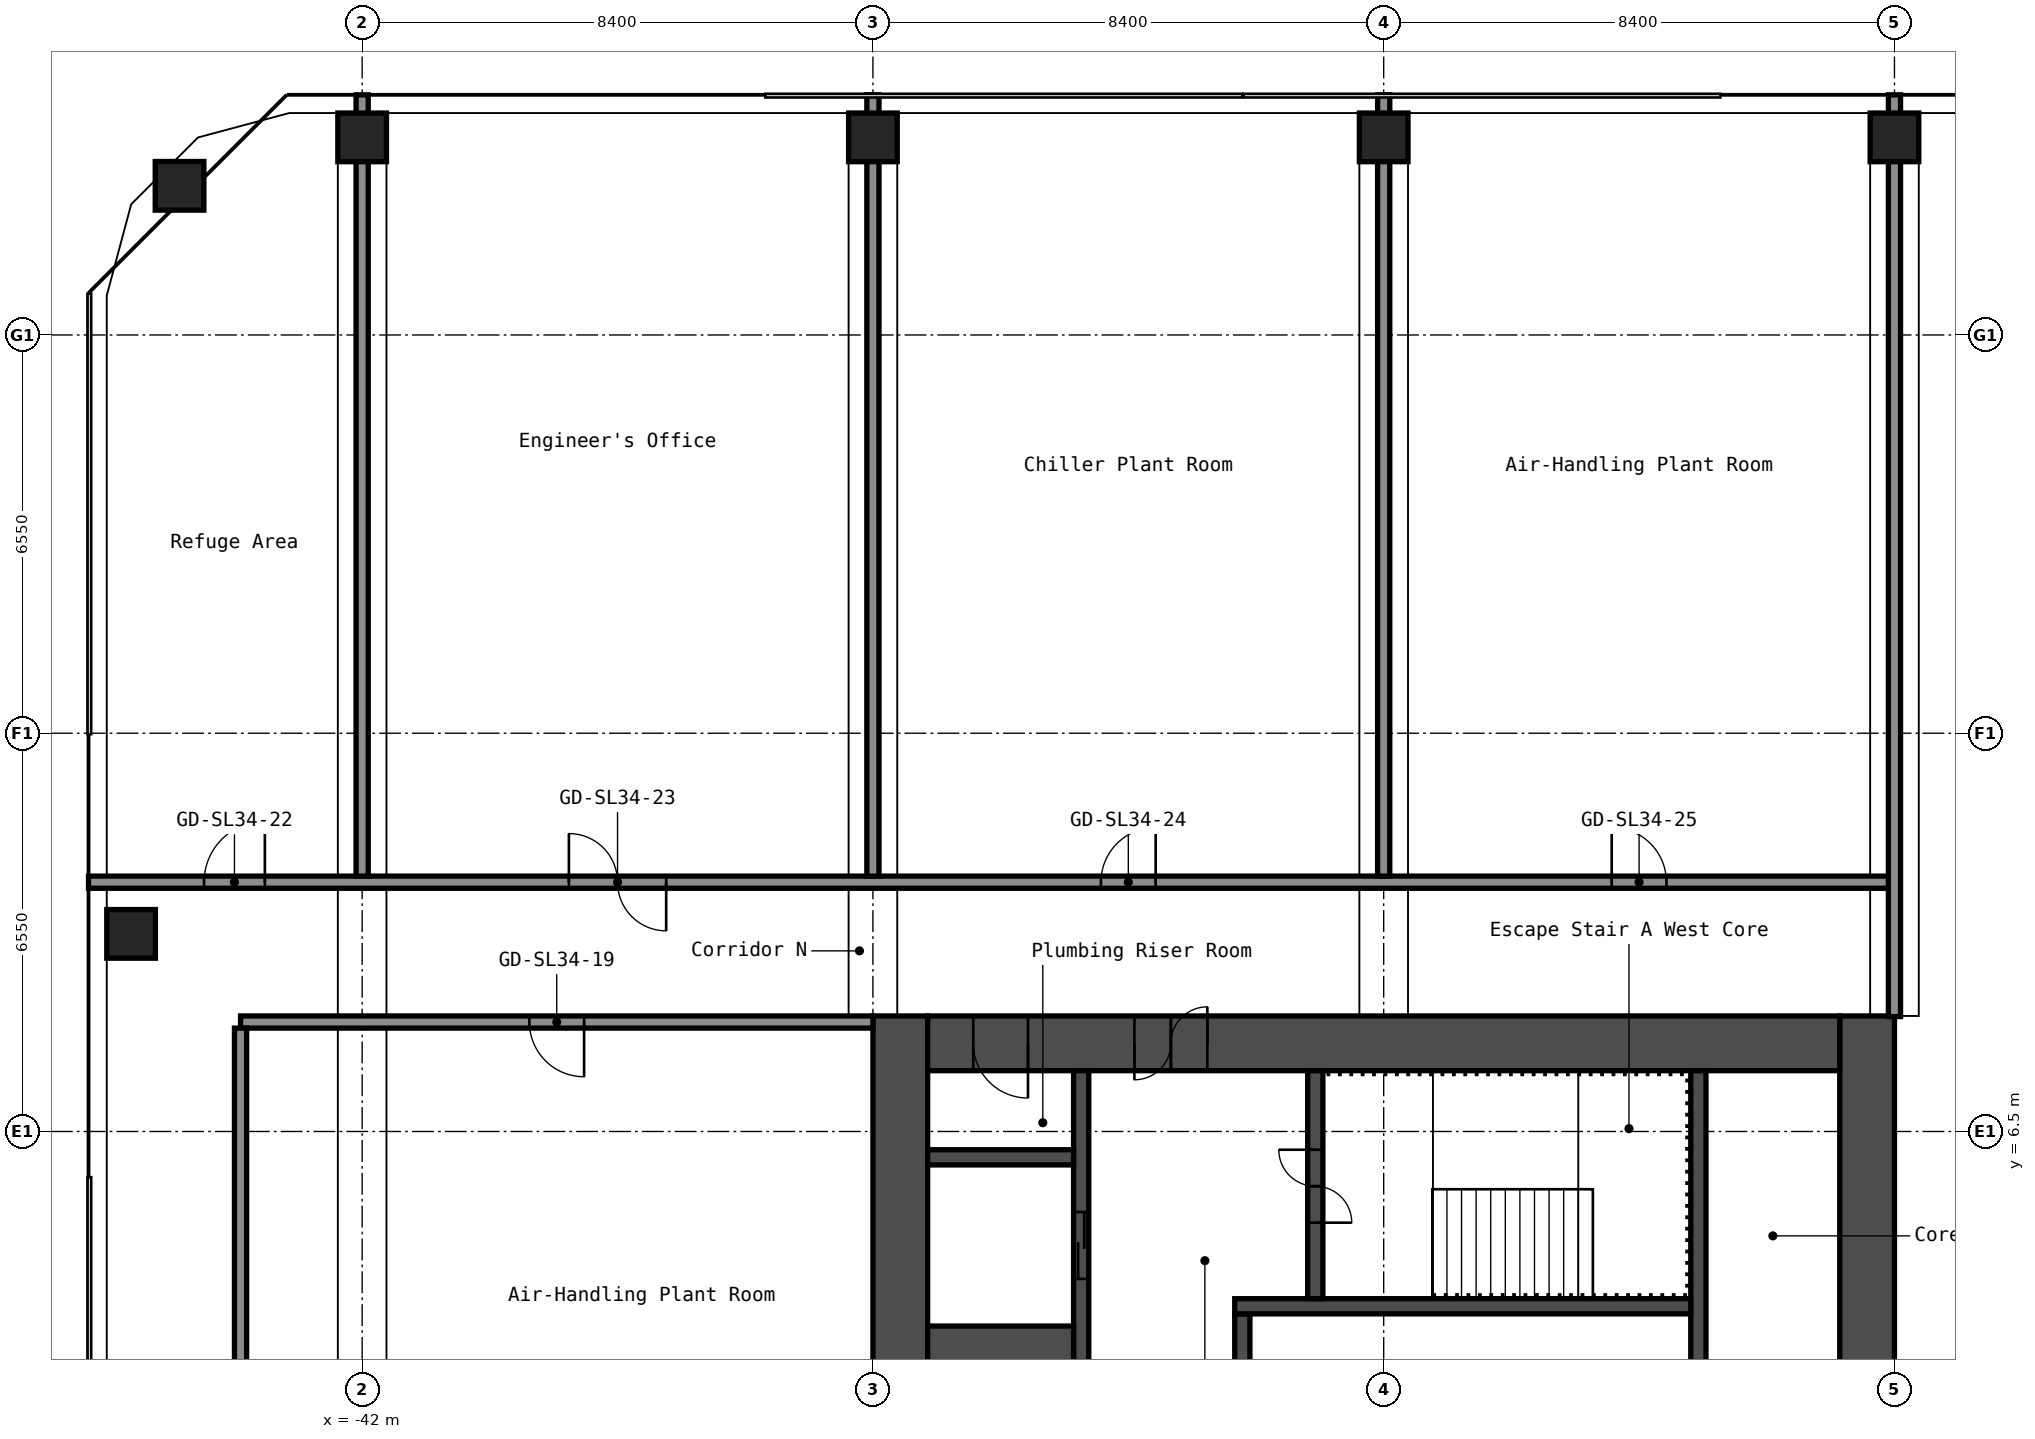
"""IFC4 building model, lengths in metres.
Left out: names, types, materials, properties, quantities, classifications, styles, units other than length and angle.
Written with IfcOpenShell. Run it as: python <this file> out.ifc"""

import sys

from ifc_helpers import new_model, si_unit, direction, frame, frame_2d, origin, origin_2d, place, context, subcontext, project, spatial, rectangle, hollow_rectangle, extrude, element, fill, save


model = new_model("IFC4")
c1 = context("Model", 3, precision=1e-05, world=origin(), true_north=direction((0.0, 1.0)))
c2 = subcontext(c1, "Body", "Model", "MODEL_VIEW")
j1 = project(units=[si_unit("LENGTHUNIT", "METRE"), si_unit("PLANEANGLEUNIT", "RADIAN")], contexts=[c1])
p1 = place(None, origin())
s1 = spatial("IfcSite", under=j1, at=p1, CompositionType="ELEMENT")
p2 = place(p1, origin())
s2 = spatial("IfcBuilding", under=s1, at=p2, CompositionType="ELEMENT")
p3 = place(p2, frame((0.0, 0.0, 120.2)))
s3 = spatial("IfcBuildingStorey", under=s2, at=p3, CompositionType="ELEMENT", Elevation=120.2)
for number, where, z_axis, x_axis in (
    (1, (-45.8, 9.75, 0.0), (0.0, 0.0, 1.0), (1.0, 0.0, 0.0)),
    (2, (-45.003, 22.053, 0.0), (0.0, 0.0, 1.0), (1.0, 0.0, 0.0)),
    (3, (-42.0, 22.85, 0.0), (0.0, 0.0, 1.0), (1.0, 0.0, 0.0)),
    (4, (-33.6, 22.85, 0.0), (0.0, 0.0, 1.0), (1.0, 0.0, 0.0)),
    (5, (-25.2, 22.85, 0.0), (0.0, 0.0, 1.0), (1.0, 0.0, 0.0)),
    (6, (-16.8, 22.85, 0.0), (0.0, 0.0, 1.0), (1.0, 0.0, 0.0)),
):
    element("IfcColumn", number, at=place(p3, frame(where, z_axis=z_axis, x_axis=x_axis)), inside=s3, PredefinedType="COLUMN", context=c2, shape_type="SweptSolid", body=[
        extrude(hollow_rectangle(XDim=0.8, YDim=0.8, WallThickness=0.032, at=origin_2d()), origin(), (0.0, 0.0, 1.0), 4.1),
    ])
p4 = place(p3, frame((-17.25, -8.4, 0.0), z_axis=(0.0, 0.0, 1.0), x_axis=(0.0, 1.0, 0.0)))
e7 = element("IfcWall", 7, at=p4, inside=s3, PredefinedType="SHEAR", context=c2, shape_type="SweptSolid", body=[
    extrude(rectangle(XDim=16.8, YDim=0.9, at=frame_2d((8.4, 0.0))), origin(), (0.0, 0.0, 1.0), 4.1),
])
p5 = place(p4, frame((7.1, 0.0, 0.0)))
e8 = element("IfcOpeningElement", 8, at=p5, cuts=e7, PredefinedType="OPENING", context=c2, shape_type="SweptSolid", body=[
    extrude(rectangle(XDim=1.6, YDim=2.1, at=frame_2d((0.8, 1.05))), frame((0.0, 0.46, 0.0), z_axis=(0.0, -1.0, 0.0), x_axis=(1.0, 0.0, 0.0)), (0.0, 0.0, 1.0), 0.92),
])
p6 = place(p3, frame((-33.15, -8.4, 0.0), z_axis=(0.0, 0.0, 1.0), x_axis=(0.0, 1.0, 0.0)))
e9 = element("IfcWall", 9, at=p6, inside=s3, PredefinedType="SHEAR", context=c2, shape_type="SweptSolid", body=[
    extrude(rectangle(XDim=16.8, YDim=0.9, at=frame_2d((8.4, 0.0))), origin(), (0.0, 0.0, 1.0), 4.1),
])
p7 = place(p3, frame((-32.7, 7.95, 0.0), z_axis=(0.0, 0.0, 1.0), x_axis=(1.0, 0.0, 0.0)))
e10 = element("IfcWall", 10, at=p7, inside=s3, PredefinedType="SHEAR", context=c2, shape_type="SweptSolid", body=[
    extrude(rectangle(XDim=15.0, YDim=0.9, at=frame_2d((7.5, 0.0))), origin(), (0.0, 0.0, 1.0), 4.1),
])
p8 = place(p7, frame((3.4, 0.0, 0.0)))
e11 = element("IfcOpeningElement", 11, at=p8, cuts=e10, PredefinedType="OPENING", context=c2, shape_type="SweptSolid", body=[
    extrude(rectangle(XDim=1.2, YDim=2.1, at=frame_2d((0.6, 1.05))), frame((0.0, 0.46, 0.0), z_axis=(0.0, -1.0, 0.0), x_axis=(1.0, 0.0, 0.0)), (0.0, 0.0, 1.0), 0.92),
])
p9 = place(p7, frame((0.75, 0.0, 0.0)))
e12 = element("IfcOpeningElement", 12, at=p9, cuts=e10, PredefinedType="OPENING", context=c2, shape_type="SweptSolid", body=[
    extrude(rectangle(XDim=0.9, YDim=2.1, at=frame_2d((0.45, 1.05))), frame((0.0, 0.46, 0.0), z_axis=(0.0, -1.0, 0.0), x_axis=(1.0, 0.0, 0.0)), (0.0, 0.0, 1.0), 0.92),
])
p10 = place(p3, frame((-20.025, 1.2, 0.0), z_axis=(0.0, 0.0, 1.0), x_axis=(0.0, 1.0, 0.0)))
e13 = element("IfcWall", 13, at=p10, inside=s3, PredefinedType="SHEAR", context=c2, shape_type="SweptSolid", body=[
    extrude(rectangle(XDim=6.3, YDim=0.25, at=frame_2d((3.15, 0.0))), origin(), (0.0, 0.0, 1.0), 4.1),
])
p11 = place(p3, frame((-27.525, 1.45, 0.0), z_axis=(0.0, 0.0, 1.0), x_axis=(0.0, 1.0, 0.0)))
e14 = element("IfcWall", 14, at=p11, inside=s3, PredefinedType="SHEAR", context=c2, shape_type="SweptSolid", body=[
    extrude(rectangle(XDim=2.05, YDim=0.25, at=frame_2d((1.025, 0.0))), origin(), (0.0, 0.0, 1.0), 4.1),
])
p12 = place(p3, frame((-27.65, 3.625, 0.0), z_axis=(0.0, 0.0, 1.0), x_axis=(1.0, 0.0, 0.0)))
e15 = element("IfcWall", 15, at=p12, inside=s3, PredefinedType="SHEAR", context=c2, shape_type="SweptSolid", body=[
    extrude(rectangle(XDim=7.5, YDim=0.25, at=frame_2d((3.75, 0.0))), origin(), (0.0, 0.0, 1.0), 4.1),
])
p13 = place(p3, frame((-26.325, 3.75, 0.0), z_axis=(0.0, 0.0, 1.0), x_axis=(0.0, 1.0, 0.0)))
e16 = element("IfcWall", 16, at=p13, inside=s3, PredefinedType="SHEAR", context=c2, shape_type="SweptSolid", body=[
    extrude(rectangle(XDim=3.75, YDim=0.25, at=frame_2d((1.875, 0.0))), origin(), (0.0, 0.0, 1.0), 4.1),
])
p14 = place(p13, frame((1.25, 0.0, 0.0)))
e17 = element("IfcOpeningElement", 17, at=p14, cuts=e16, PredefinedType="OPENING", context=c2, shape_type="SweptSolid", body=[
    extrude(rectangle(XDim=1.2, YDim=2.1, at=frame_2d((0.6, 1.05))), frame((0.0, 0.135, 0.0), z_axis=(0.0, -1.0, 0.0), x_axis=(1.0, 0.0, 0.0)), (0.0, 0.0, 1.0), 0.27),
])
p15 = place(p3, frame((-30.175, 1.45, 0.0), z_axis=(0.0, 0.0, 1.0), x_axis=(0.0, 1.0, 0.0)))
e18 = element("IfcWall", 18, at=p15, inside=s3, PredefinedType="SHEAR", context=c2, shape_type="SweptSolid", body=[
    extrude(rectangle(XDim=6.05, YDim=0.25, at=frame_2d((3.025, 0.0))), origin(), (0.0, 0.0, 1.0), 4.1),
])
p16 = place(p15, frame((2.625, 0.0, 0.0)))
e19 = element("IfcOpeningElement", 19, at=p16, cuts=e18, PredefinedType="OPENING", context=c2, shape_type="SweptSolid", body=[
    extrude(rectangle(XDim=1.1, YDim=2.1, at=frame_2d((0.55, 1.05))), frame((0.0, 0.135, 0.0), z_axis=(0.0, -1.0, 0.0), x_axis=(1.0, 0.0, 0.0)), (0.0, 0.0, 1.0), 0.27),
])
p17 = place(p3, frame((-32.7, 2.375, 0.0), z_axis=(0.0, 0.0, 1.0), x_axis=(1.0, 0.0, 0.0)))
e20 = element("IfcWall", 20, at=p17, inside=s3, PredefinedType="SHEAR", context=c2, shape_type="SweptSolid", body=[
    extrude(rectangle(XDim=2.4, YDim=1.85, at=frame_2d((1.2, 0.0))), origin(), (0.0, 0.0, 1.0), 4.1),
])
p18 = place(p3, frame((-32.7, 6.075, 0.0), z_axis=(0.0, 0.0, 1.0), x_axis=(1.0, 0.0, 0.0)))
e21 = element("IfcWall", 21, at=p18, inside=s3, PredefinedType="SHEAR", context=c2, shape_type="SweptSolid", body=[
    extrude(rectangle(XDim=2.4, YDim=0.25, at=frame_2d((1.2, 0.0))), origin(), (0.0, 0.0, 1.0), 4.1),
])
p19 = place(p3, frame((-44.0, 8.3, 0.0), z_axis=(0.0, 0.0, 1.0), x_axis=(1.0, 0.0, 0.0)))
e22 = element("IfcWall", 22, at=p19, inside=s3, PredefinedType="PARTITIONING", context=c2, shape_type="SweptSolid", body=[
    extrude(rectangle(XDim=10.4, YDim=0.2, at=frame_2d((5.2, 0.0))), origin(), (0.0, 0.0, 1.0), 4.1),
])
p20 = place(p19, frame((4.75, 0.0, 0.0)))
e23 = element("IfcOpeningElement", 23, at=p20, cuts=e22, PredefinedType="OPENING", context=c2, shape_type="SweptSolid", body=[
    extrude(rectangle(XDim=0.9, YDim=2.1, at=frame_2d((0.45, 1.05))), frame((0.0, 0.11, 0.0), z_axis=(0.0, -1.0, 0.0), x_axis=(1.0, 0.0, 0.0)), (0.0, 0.0, 1.0), 0.22),
])
p21 = place(p3, frame((-46.5, 10.6, 0.0), z_axis=(0.0, 0.0, 1.0), x_axis=(1.0, 0.0, 0.0)))
e24 = element("IfcWall", 24, at=p21, inside=s3, PredefinedType="PARTITIONING", context=c2, shape_type="SweptSolid", body=[
    extrude(rectangle(XDim=29.7, YDim=0.2, at=frame_2d((14.85, 0.0))), origin(), (0.0, 0.0, 1.0), 4.1),
])
p22 = place(p21, frame((1.9, 0.0, 0.0)))
e25 = element("IfcOpeningElement", 25, at=p22, cuts=e24, PredefinedType="OPENING", context=c2, shape_type="SweptSolid", body=[
    extrude(rectangle(XDim=1.0, YDim=2.1, at=frame_2d((0.5, 1.05))), frame((0.0, 0.11, 0.0), z_axis=(0.0, -1.0, 0.0), x_axis=(1.0, 0.0, 0.0)), (0.0, 0.0, 1.0), 0.22),
])
p23 = place(p21, frame((7.9, 0.0, 0.0)))
e26 = element("IfcOpeningElement", 26, at=p23, cuts=e24, PredefinedType="OPENING", context=c2, shape_type="SweptSolid", body=[
    extrude(rectangle(XDim=1.6, YDim=2.1, at=frame_2d((0.8, 1.05))), frame((0.0, 0.11, 0.0), z_axis=(0.0, -1.0, 0.0), x_axis=(1.0, 0.0, 0.0)), (0.0, 0.0, 1.0), 0.22),
])
p24 = place(p21, frame((16.65, 0.0, 0.0)))
e27 = element("IfcOpeningElement", 27, at=p24, cuts=e24, PredefinedType="OPENING", context=c2, shape_type="SweptSolid", body=[
    extrude(rectangle(XDim=0.9, YDim=2.1, at=frame_2d((0.45, 1.05))), frame((0.0, 0.11, 0.0), z_axis=(0.0, -1.0, 0.0), x_axis=(1.0, 0.0, 0.0)), (0.0, 0.0, 1.0), 0.22),
])
p25 = place(p21, frame((25.05, 0.0, 0.0)))
e28 = element("IfcOpeningElement", 28, at=p25, cuts=e24, PredefinedType="OPENING", context=c2, shape_type="SweptSolid", body=[
    extrude(rectangle(XDim=0.9, YDim=2.1, at=frame_2d((0.45, 1.05))), frame((0.0, 0.11, 0.0), z_axis=(0.0, -1.0, 0.0), x_axis=(1.0, 0.0, 0.0)), (0.0, 0.0, 1.0), 0.22),
])
p26 = place(p3, frame((-44.0, -8.2, 0.0), z_axis=(0.0, 0.0, 1.0), x_axis=(0.0, 1.0, 0.0)))
e29 = element("IfcWall", 29, at=p26, inside=s3, PredefinedType="PARTITIONING", context=c2, shape_type="SweptSolid", body=[
    extrude(rectangle(XDim=16.4, YDim=0.2, at=frame_2d((8.2, 0.0))), origin(), (0.0, 0.0, 1.0), 4.1),
])
for number, where, z_axis, x_axis in (
    (30, (-42.0, 10.7, 0.0), (0.0, 0.0, 1.0), (0.0, 1.0, 0.0)),
    (31, (-33.6, 10.7, 0.0), (0.0, 0.0, 1.0), (0.0, 1.0, 0.0)),
    (32, (-25.2, 10.7, 0.0), (0.0, 0.0, 1.0), (0.0, 1.0, 0.0)),
):
    element("IfcWall", number, at=place(p3, frame(where, z_axis=z_axis, x_axis=x_axis)), inside=s3, PredefinedType="PARTITIONING", context=c2, shape_type="SweptSolid", body=[
        extrude(rectangle(XDim=12.85, YDim=0.2, at=frame_2d((6.425, 0.0))), origin(), (0.0, 0.0, 1.0), 4.1),
    ])
p27 = place(p3, frame((-16.8, 8.39, 0.0), z_axis=(0.0, 0.0, 1.0), x_axis=(0.0, 1.0, 0.0)))
e33 = element("IfcWall", 33, at=p27, inside=s3, PredefinedType="PARTITIONING", context=c2, shape_type="SweptSolid", body=[
    extrude(rectangle(XDim=15.16, YDim=0.2, at=frame_2d((7.58, 0.0))), origin(), (0.0, 0.0, 1.0), 4.1),
])
p28 = place(p8, origin())
e34 = element("IfcDoor", 34, at=p28, inside=s3, OperationType="DOUBLE_DOOR_SINGLE_SWING", PredefinedType="DOOR", context=c2, shape_type="SweptSolid", body=[
    extrude(rectangle(XDim=1.2, YDim=2.1, at=frame_2d((0.6, 1.05))), frame((0.0, 0.025, 0.0), z_axis=(0.0, -1.0, 0.0), x_axis=(1.0, 0.0, 0.0)), (0.0, 0.0, 1.0), 0.05),
])
fill(e11, e34)
p29 = place(p9, origin())
e35 = element("IfcDoor", 35, at=p29, inside=s3, OperationType="SINGLE_SWING_RIGHT", PredefinedType="DOOR", context=c2, shape_type="SweptSolid", body=[
    extrude(rectangle(XDim=0.9, YDim=2.1, at=frame_2d((0.45, 1.05))), frame((0.0, 0.025, 0.0), z_axis=(0.0, -1.0, 0.0), x_axis=(1.0, 0.0, 0.0)), (0.0, 0.0, 1.0), 0.05),
])
fill(e12, e35)
p30 = place(p14, origin())
e36 = element("IfcDoor", 36, at=p30, inside=s3, OperationType="DOUBLE_DOOR_SINGLE_SWING", PredefinedType="DOOR", context=c2, shape_type="SweptSolid", body=[
    extrude(rectangle(XDim=1.2, YDim=2.1, at=frame_2d((0.6, 1.05))), frame((0.0, 0.025, 0.0), z_axis=(0.0, -1.0, 0.0), x_axis=(1.0, 0.0, 0.0)), (0.0, 0.0, 1.0), 0.05),
])
fill(e17, e36)
p31 = place(p16, origin())
e37 = element("IfcDoor", 37, at=p31, inside=s3, OperationType="DOUBLE_DOOR_SLIDING", PredefinedType="DOOR", context=c2, shape_type="SweptSolid", body=[
    extrude(rectangle(XDim=1.1, YDim=2.1, at=frame_2d((0.55, 1.05))), frame((0.0, 0.025, 0.0), z_axis=(0.0, -1.0, 0.0), x_axis=(1.0, 0.0, 0.0)), (0.0, 0.0, 1.0), 0.05),
])
fill(e19, e37)
p32 = place(p20, origin())
e38 = element("IfcDoor", 38, at=p32, inside=s3, OperationType="SINGLE_SWING_RIGHT", PredefinedType="DOOR", context=c2, shape_type="SweptSolid", body=[
    extrude(rectangle(XDim=0.9, YDim=2.1, at=frame_2d((0.45, 1.05))), frame((0.0, 0.025, 0.0), z_axis=(0.0, -1.0, 0.0), x_axis=(1.0, 0.0, 0.0)), (0.0, 0.0, 1.0), 0.05),
])
fill(e23, e38)
p33 = place(p22, origin())
e39 = element("IfcDoor", 39, at=p33, inside=s3, OperationType="SINGLE_SWING_LEFT", PredefinedType="DOOR", context=c2, shape_type="SweptSolid", body=[
    extrude(rectangle(XDim=1.0, YDim=2.1, at=frame_2d((0.5, 1.05))), frame((0.0, 0.025, 0.0), z_axis=(0.0, -1.0, 0.0), x_axis=(1.0, 0.0, 0.0)), (0.0, 0.0, 1.0), 0.05),
])
fill(e25, e39)
p34 = place(p23, origin())
e40 = element("IfcDoor", 40, at=p34, inside=s3, OperationType="DOUBLE_DOOR_SINGLE_SWING", PredefinedType="DOOR", context=c2, shape_type="SweptSolid", body=[
    extrude(rectangle(XDim=1.6, YDim=2.1, at=frame_2d((0.8, 1.05))), frame((0.0, 0.025, 0.0), z_axis=(0.0, -1.0, 0.0), x_axis=(1.0, 0.0, 0.0)), (0.0, 0.0, 1.0), 0.05),
])
fill(e26, e40)
p35 = place(p24, origin())
e41 = element("IfcDoor", 41, at=p35, inside=s3, OperationType="SINGLE_SWING_LEFT", PredefinedType="DOOR", context=c2, shape_type="SweptSolid", body=[
    extrude(rectangle(XDim=0.9, YDim=2.1, at=frame_2d((0.45, 1.05))), frame((0.0, 0.025, 0.0), z_axis=(0.0, -1.0, 0.0), x_axis=(1.0, 0.0, 0.0)), (0.0, 0.0, 1.0), 0.05),
])
fill(e27, e41)
p36 = place(p25, origin())
e42 = element("IfcDoor", 42, at=p36, inside=s3, OperationType="SINGLE_SWING_RIGHT", PredefinedType="DOOR", context=c2, shape_type="SweptSolid", body=[
    extrude(rectangle(XDim=0.9, YDim=2.1, at=frame_2d((0.45, 1.05))), frame((0.0, 0.025, 0.0), z_axis=(0.0, -1.0, 0.0), x_axis=(1.0, 0.0, 0.0)), (0.0, 0.0, 1.0), 0.05),
])
fill(e28, e42)
save(model, sys.argv[1])
